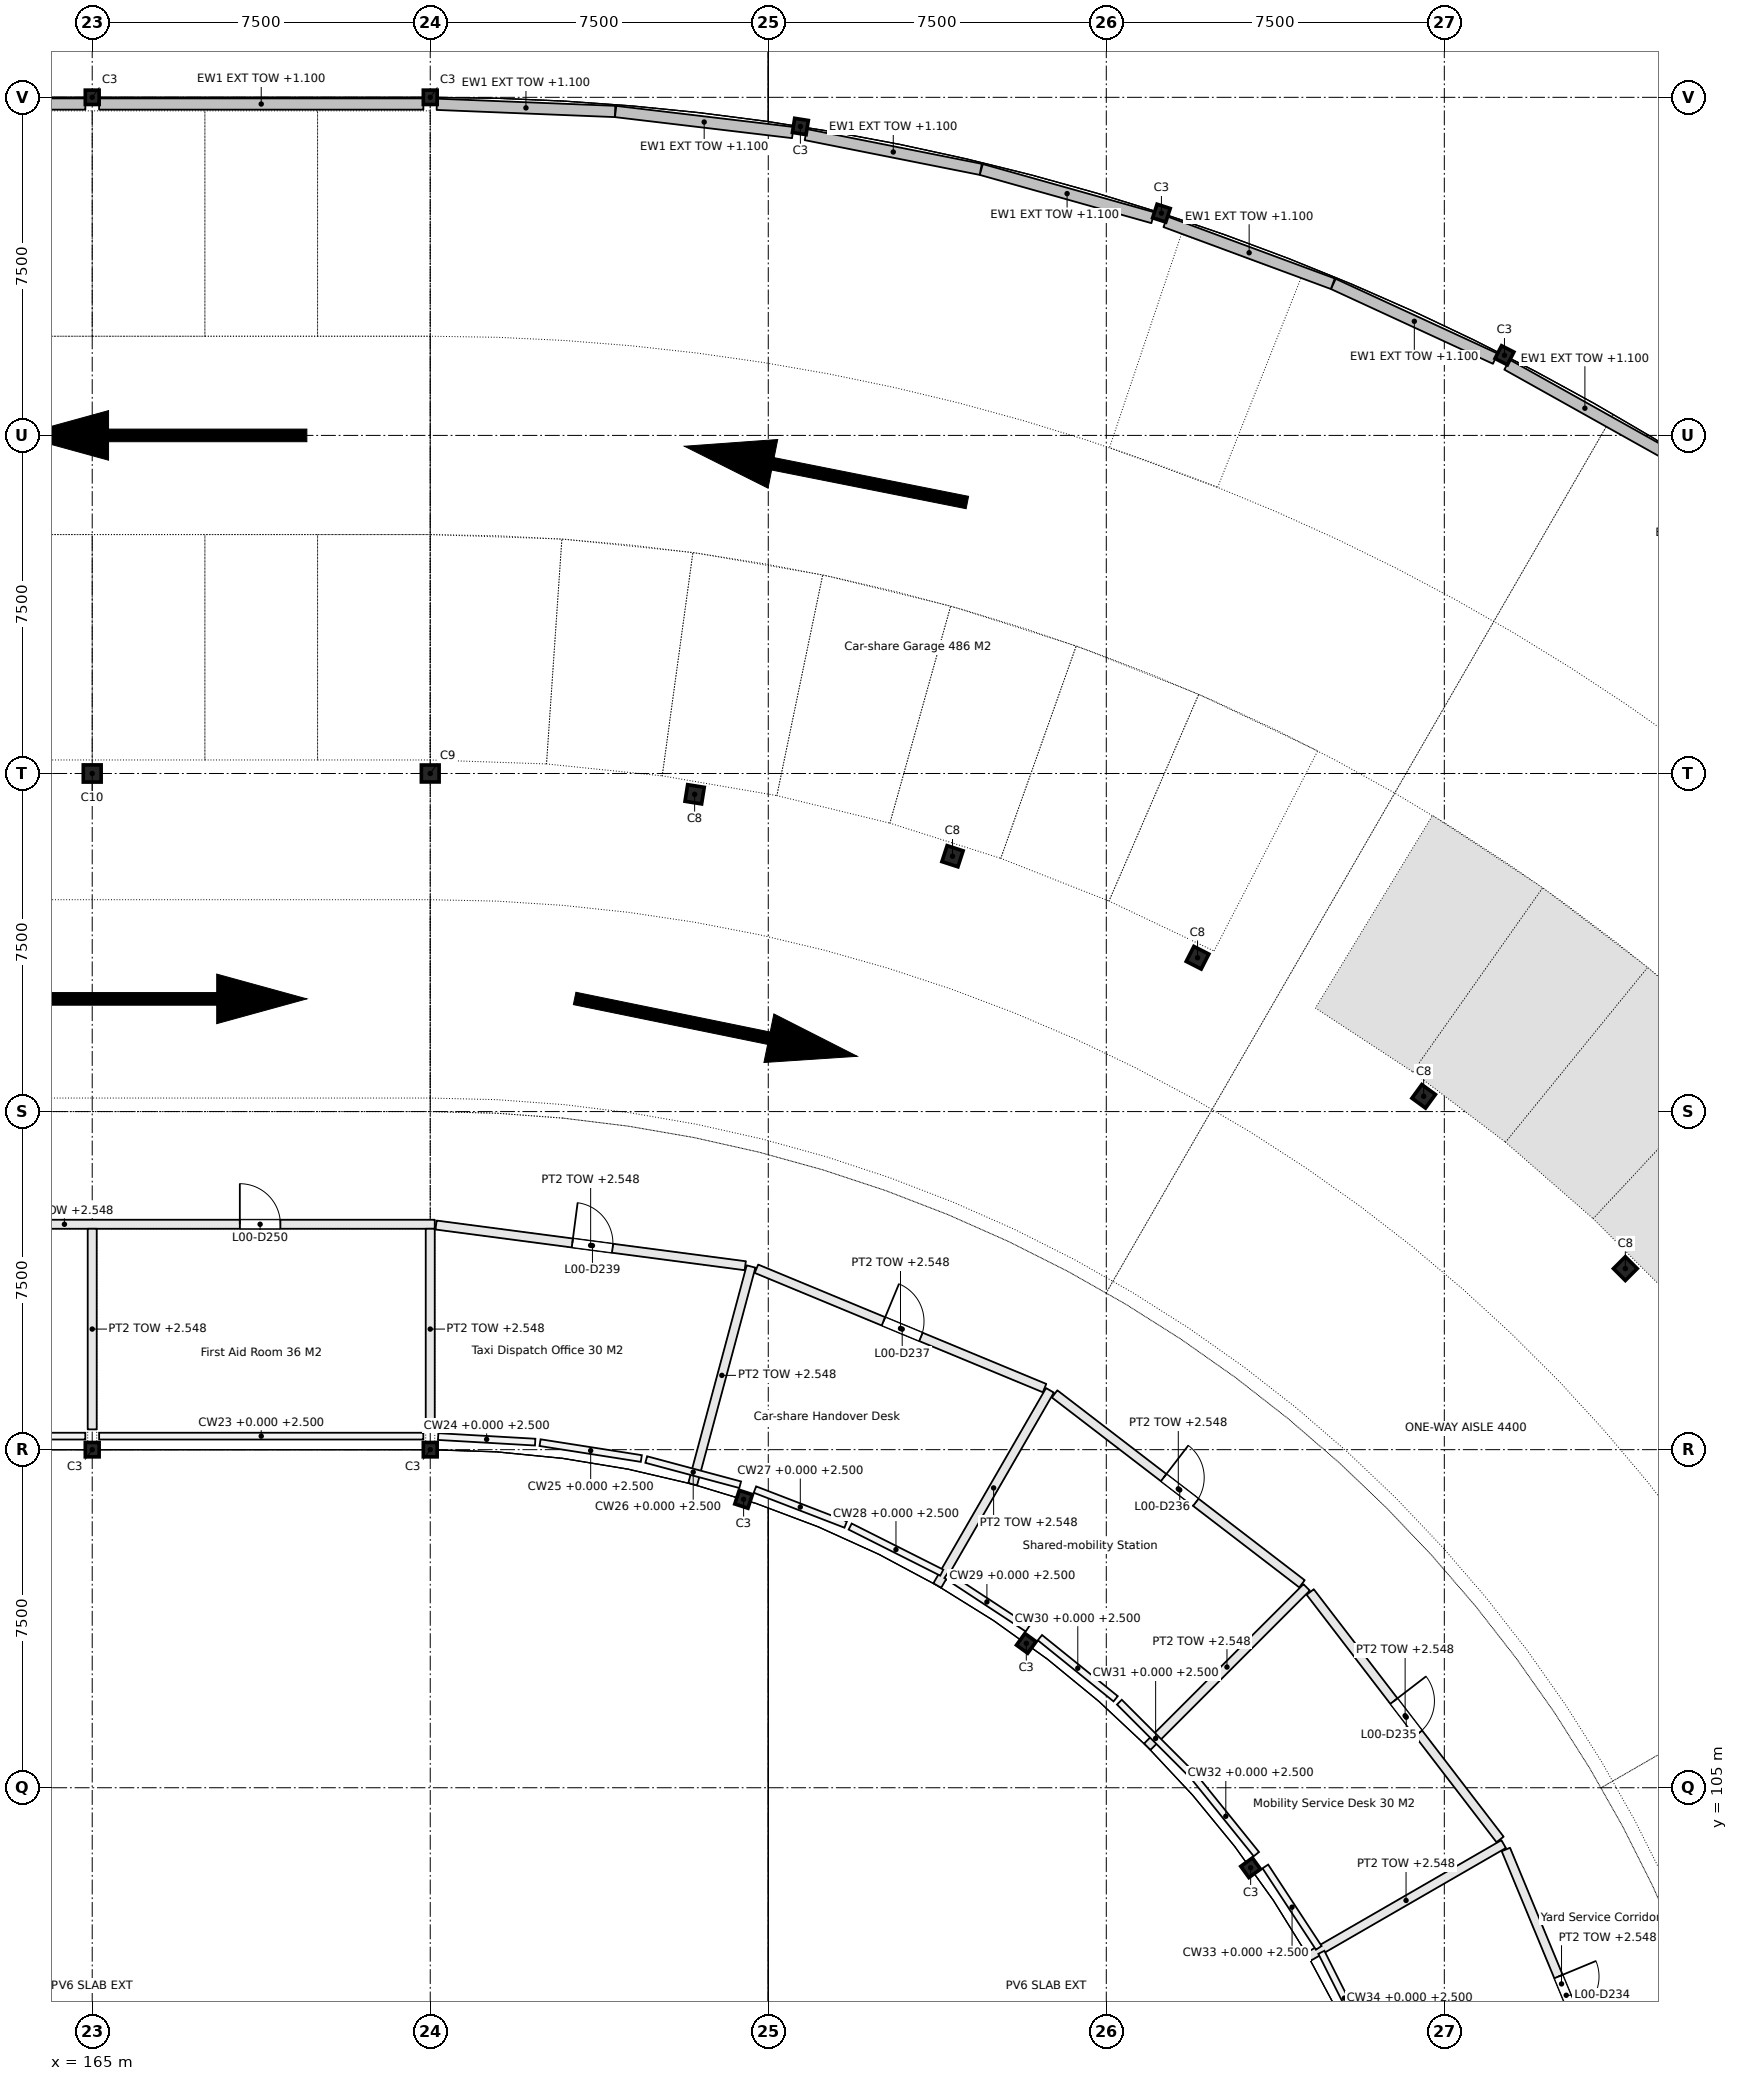
"""IFC4 building model, lengths in metres.
Left out: names, types, materials, properties, quantities, classifications, styles, units other than length and angle.
Written with IfcOpenShell. Run it as: python <this file> out.ifc"""

import sys

from ifc_helpers import new_model, si_unit, direction, frame, frame_2d, origin, origin_2d, place, context, subcontext, project, spatial, rectangle, i_section, extrude, element, fill, save


model = new_model("IFC4")
c1 = context("Model", 3, precision=1e-05, world=origin(), true_north=direction((0.0, 1.0)))
c2 = subcontext(c1, "Body", "Model", "MODEL_VIEW")
j1 = project(units=[si_unit("LENGTHUNIT", "METRE"), si_unit("PLANEANGLEUNIT", "RADIAN")], contexts=[c1])
p1 = place(None, origin())
s1 = spatial("IfcSite", under=j1, at=p1, CompositionType="ELEMENT")
p2 = place(p1, origin())
s2 = spatial("IfcBuilding", under=s1, at=p2, CompositionType="ELEMENT")
p3 = place(p2, origin())
s3 = spatial("IfcBuildingStorey", under=s2, at=p3, CompositionType="ELEMENT", Elevation=0.0)
p4 = place(p3, frame((165.0, 112.5, -0.25), z_axis=(0.0, 0.0, 1.0), x_axis=(1.0, 0.0, 0.0)))
e1 = element("IfcColumn", 1, at=p4, inside=s3, PredefinedType="COLUMN", context=c2, shape_type="SweptSolid", body=[
    extrude(i_section(OverallWidth=0.307, OverallDepth=0.318, WebThickness=0.013, FlangeThickness=0.021, FilletRadius=0.015, at=origin_2d()), origin(), (0.0, 0.0, 1.0), 3.55),
])
p5 = place(p3, frame((165.0, 127.5, -0.25), z_axis=(0.0, 0.0, 1.0), x_axis=(1.0, 0.0, 0.0)))
e2 = element("IfcColumn", 2, at=p5, inside=s3, PredefinedType="COLUMN", context=c2, shape_type="SweptSolid", body=[
    extrude(i_section(OverallWidth=0.396, OverallDepth=0.381, WebThickness=0.019, FlangeThickness=0.03, FilletRadius=0.015, at=origin_2d()), origin(), (0.0, 0.0, 1.0), 3.55),
])
for number, where, z_axis, x_axis in (
    (3, (165.0, 142.5, -0.25), (0.0, 0.0, 1.0), (1.0, 0.0, 0.0)),
    (4, (172.5, 112.5, -0.25), (0.0, 0.0, 1.0), (1.0, 0.0, 0.0)),
):
    element("IfcColumn", number, at=place(p3, frame(where, z_axis=z_axis, x_axis=x_axis)), inside=s3, PredefinedType="COLUMN", context=c2, shape_type="SweptSolid", body=[
        extrude(i_section(OverallWidth=0.307, OverallDepth=0.318, WebThickness=0.013, FlangeThickness=0.021, FilletRadius=0.015, at=origin_2d()), origin(), (0.0, 0.0, 1.0), 3.55),
    ])
p6 = place(p3, frame((172.5, 127.5, -0.25), z_axis=(0.0, 0.0, 1.0), x_axis=(1.0, 0.0, 0.0)))
e5 = element("IfcColumn", 5, at=p6, inside=s3, PredefinedType="COLUMN", context=c2, shape_type="SweptSolid", body=[
    extrude(i_section(OverallWidth=0.394, OverallDepth=0.376, WebThickness=0.017, FlangeThickness=0.028, FilletRadius=0.015, at=origin_2d()), origin(), (0.0, 0.0, 1.0), 3.55),
])
for number, where, z_axis, x_axis in (
    (6, (172.5, 142.5, -0.25), (0.0, 0.0, 1.0), (1.0, 0.0, 0.0)),
    (7, (179.453, 111.399, -0.25), (0.0, 0.0, 1.0), (-0.951, 0.309, 0.0)),
    (8, (185.725, 108.203, -0.25), (0.0, 0.0, 1.0), (-0.809, 0.588, 0.0)),
    (9, (190.703, 103.225, -0.25), (0.0, 0.0, 1.0), (-0.588, 0.809, 0.0)),
):
    element("IfcColumn", number, at=place(p3, frame(where, z_axis=z_axis, x_axis=x_axis)), inside=s3, PredefinedType="COLUMN", context=c2, shape_type="SweptSolid", body=[
        extrude(i_section(OverallWidth=0.307, OverallDepth=0.318, WebThickness=0.013, FlangeThickness=0.021, FilletRadius=0.015, at=origin_2d()), origin(), (0.0, 0.0, 1.0), 3.55),
    ])
for number, where, z_axis, x_axis in (
    (10, (178.366, 127.038, -0.25), (0.0, 0.0, 1.0), (-0.988, 0.156, 0.0)),
    (11, (184.088, 125.665, -0.25), (0.0, 0.0, 1.0), (-0.951, 0.309, 0.0)),
    (12, (189.525, 123.413, -0.25), (0.0, 0.0, 1.0), (-0.891, 0.454, 0.0)),
    (13, (194.542, 120.338, -0.25), (0.0, 0.0, 1.0), (-0.809, 0.588, 0.0)),
    (14, (199.017, 116.517, -0.25), (0.0, 0.0, 1.0), (-0.707, 0.707, 0.0)),
):
    element("IfcColumn", number, at=place(p3, frame(where, z_axis=z_axis, x_axis=x_axis)), inside=s3, PredefinedType="COLUMN", context=c2, shape_type="SweptSolid", body=[
        extrude(i_section(OverallWidth=0.373, OverallDepth=0.373, WebThickness=0.016, FlangeThickness=0.026, FilletRadius=0.015, at=origin_2d()), origin(), (0.0, 0.0, 1.0), 3.55),
    ])
for number, where, z_axis, x_axis in (
    (15, (180.713, 141.854, -0.25), (0.0, 0.0, 1.0), (-0.988, 0.156, 0.0)),
    (16, (188.723, 139.93, -0.25), (0.0, 0.0, 1.0), (-0.951, 0.309, 0.0)),
    (17, (196.334, 136.778, -0.25), (0.0, 0.0, 1.0), (-0.891, 0.454, 0.0)),
):
    element("IfcColumn", number, at=place(p3, frame(where, z_axis=z_axis, x_axis=x_axis)), inside=s3, PredefinedType="COLUMN", context=c2, shape_type="SweptSolid", body=[
        extrude(i_section(OverallWidth=0.307, OverallDepth=0.318, WebThickness=0.013, FlangeThickness=0.021, FilletRadius=0.015, at=origin_2d()), origin(), (0.0, 0.0, 1.0), 3.55),
    ])
p7 = place(p3, frame((150.0, 117.5, 0.0), z_axis=(0.0, 0.0, 1.0), x_axis=(1.0, 0.0, 0.0)))
e18 = element("IfcWall", 18, at=p7, inside=s3, PredefinedType="PARTITIONING", context=c2, shape_type="SweptSolid", body=[
    extrude(rectangle(XDim=22.6, YDim=0.2, at=frame_2d((11.3, 0.0))), origin(), (0.0, 0.0, 1.0), 2.548),
])
p8 = place(p7, frame((3.55, 0.0, 0.0)))
e19 = element("IfcOpeningElement", 19, at=p8, cuts=e18, PredefinedType="OPENING", context=c2, shape_type="SweptSolid", body=[
    extrude(rectangle(XDim=0.9, YDim=2.1, at=frame_2d((0.45, 1.05))), frame((0.0, 0.11, 0.0), z_axis=(0.0, -1.0, 0.0), x_axis=(1.0, 0.0, 0.0)), (0.0, 0.0, 1.0), 0.22),
])
p9 = place(p7, frame((10.775, 0.0, 0.0)))
e20 = element("IfcOpeningElement", 20, at=p9, cuts=e18, PredefinedType="OPENING", context=c2, shape_type="SweptSolid", body=[
    extrude(rectangle(XDim=0.9, YDim=2.1, at=frame_2d((0.45, 1.05))), frame((0.0, 0.11, 0.0), z_axis=(0.0, -1.0, 0.0), x_axis=(1.0, 0.0, 0.0)), (0.0, 0.0, 1.0), 0.22),
])
p10 = place(p7, frame((18.275, 0.0, 0.0)))
e21 = element("IfcOpeningElement", 21, at=p10, cuts=e18, PredefinedType="OPENING", context=c2, shape_type="SweptSolid", body=[
    extrude(rectangle(XDim=0.9, YDim=2.1, at=frame_2d((0.45, 1.05))), frame((0.0, 0.11, 0.0), z_axis=(0.0, -1.0, 0.0), x_axis=(1.0, 0.0, 0.0)), (0.0, 0.0, 1.0), 0.22),
])
p11 = place(p3, frame((172.629, 117.483, 0.0), z_axis=(0.0, 0.0, 1.0), x_axis=(0.991450812405, -0.130480981682, 0.0)))
e22 = element("IfcWall", 22, at=p11, inside=s3, PredefinedType="PARTITIONING", context=c2, shape_type="SweptSolid", body=[
    extrude(rectangle(XDim=6.919, YDim=0.2, at=frame_2d((3.459, 0.0))), origin(), (0.0, 0.0, 1.0), 2.548),
])
p12 = place(p11, frame((3.05, 0.0, 0.0)))
e23 = element("IfcOpeningElement", 23, at=p12, cuts=e22, PredefinedType="OPENING", context=c2, shape_type="SweptSolid", body=[
    extrude(rectangle(XDim=0.9, YDim=2.1, at=frame_2d((0.45, 1.05))), frame((0.0, 0.11, 0.0), z_axis=(0.0, -1.0, 0.0), x_axis=(1.0, 0.0, 0.0)), (0.0, 0.0, 1.0), 0.22),
])
p13 = place(p3, frame((178.323, 111.733, 0.0), z_axis=(0.0, 0.0, 1.0), x_axis=(0.258950830838, 0.965890504772, 0.0)))
e24 = element("IfcWall", 24, at=p13, inside=s3, PredefinedType="PARTITIONING", context=c2, shape_type="SweptSolid", body=[
    extrude(rectangle(XDim=5.001, YDim=0.2, at=frame_2d((2.5, 0.0))), origin(), (0.0, 0.0, 1.0), 2.548),
])
p14 = place(p3, frame((179.738, 116.513, 0.0), z_axis=(0.0, 0.0, 1.0), x_axis=(0.923886085904, -0.382667610693, 0.0)))
e25 = element("IfcWall", 25, at=p14, inside=s3, PredefinedType="PARTITIONING", context=c2, shape_type="SweptSolid", body=[
    extrude(rectangle(XDim=6.918, YDim=0.2, at=frame_2d((3.459, 0.0))), origin(), (0.0, 0.0, 1.0), 2.548),
])
p15 = place(p14, frame((3.05, 0.0, 0.0)))
e26 = element("IfcOpeningElement", 26, at=p15, cuts=e25, PredefinedType="OPENING", context=c2, shape_type="SweptSolid", body=[
    extrude(rectangle(XDim=0.9, YDim=2.1, at=frame_2d((0.45, 1.05))), frame((0.0, 0.11, 0.0), z_axis=(0.0, -1.0, 0.0), x_axis=(1.0, 0.0, 0.0)), (0.0, 0.0, 1.0), 0.22),
])
p16 = place(p3, frame((183.75, 109.486, 0.0), z_axis=(0.0, 0.0, 1.0), x_axis=(0.50002537861, 0.866010750942, 0.0)))
e27 = element("IfcWall", 27, at=p16, inside=s3, PredefinedType="PARTITIONING", context=c2, shape_type="SweptSolid", body=[
    extrude(rectangle(XDim=5.0, YDim=0.2, at=frame_2d((2.5, 0.0))), origin(), (0.0, 0.0, 1.0), 2.548),
])
p17 = place(p3, frame((186.353, 113.737, 0.0), z_axis=(0.0, 0.0, 1.0), x_axis=(0.793285942034, -0.608849254061, 0.0)))
e28 = element("IfcWall", 28, at=p17, inside=s3, PredefinedType="PARTITIONING", context=c2, shape_type="SweptSolid", body=[
    extrude(rectangle(XDim=6.919, YDim=0.2, at=frame_2d((3.459, 0.0))), origin(), (0.0, 0.0, 1.0), 2.548),
])
p18 = place(p17, frame((3.05, 0.0, 0.0)))
e29 = element("IfcOpeningElement", 29, at=p18, cuts=e28, PredefinedType="OPENING", context=c2, shape_type="SweptSolid", body=[
    extrude(rectangle(XDim=0.9, YDim=2.1, at=frame_2d((0.45, 1.05))), frame((0.0, 0.11, 0.0), z_axis=(0.0, -1.0, 0.0), x_axis=(1.0, 0.0, 0.0)), (0.0, 0.0, 1.0), 0.22),
])
p19 = place(p3, frame((188.41, 105.91, 0.0), z_axis=(0.0, 0.0, 1.0), x_axis=(0.707106781187, 0.707106781187, 0.0)))
e30 = element("IfcWall", 30, at=p19, inside=s3, PredefinedType="PARTITIONING", context=c2, shape_type="SweptSolid", body=[
    extrude(rectangle(XDim=5.0, YDim=0.2, at=frame_2d((2.5, 0.0))), origin(), (0.0, 0.0, 1.0), 2.548),
])
p20 = place(p3, frame((192.024, 109.342, 0.0), z_axis=(0.0, 0.0, 1.0), x_axis=(0.608849254061, -0.793285942034, 0.0)))
e31 = element("IfcWall", 31, at=p20, inside=s3, PredefinedType="PARTITIONING", context=c2, shape_type="SweptSolid", body=[
    extrude(rectangle(XDim=6.919, YDim=0.2, at=frame_2d((3.459, 0.0))), origin(), (0.0, 0.0, 1.0), 2.548),
])
p21 = place(p20, frame((3.05, 0.0, 0.0)))
e32 = element("IfcOpeningElement", 32, at=p21, cuts=e31, PredefinedType="OPENING", context=c2, shape_type="SweptSolid", body=[
    extrude(rectangle(XDim=0.9, YDim=2.1, at=frame_2d((0.45, 1.05))), frame((0.0, 0.11, 0.0), z_axis=(0.0, -1.0, 0.0), x_axis=(1.0, 0.0, 0.0)), (0.0, 0.0, 1.0), 0.22),
])
p22 = place(p3, frame((191.986, 101.25, 0.0), z_axis=(0.0, 0.0, 1.0), x_axis=(0.866010750942, 0.50002537861, 0.0)))
e33 = element("IfcWall", 33, at=p22, inside=s3, PredefinedType="PARTITIONING", context=c2, shape_type="SweptSolid", body=[
    extrude(rectangle(XDim=5.0, YDim=0.2, at=frame_2d((2.5, 0.0))), origin(), (0.0, 0.0, 1.0), 2.548),
])
p23 = place(p3, frame((196.366, 103.63, 0.0), z_axis=(0.0, 0.0, 1.0), x_axis=(0.382667610693, -0.923886085904, 0.0)))
e34 = element("IfcWall", 34, at=p23, inside=s3, PredefinedType="PARTITIONING", context=c2, shape_type="SweptSolid", body=[
    extrude(rectangle(XDim=6.918, YDim=0.2, at=frame_2d((3.459, 0.0))), origin(), (0.0, 0.0, 1.0), 2.548),
])
p24 = place(p23, frame((3.05, 0.0, 0.0)))
e35 = element("IfcOpeningElement", 35, at=p24, cuts=e34, PredefinedType="OPENING", context=c2, shape_type="SweptSolid", body=[
    extrude(rectangle(XDim=0.9, YDim=2.1, at=frame_2d((0.45, 1.05))), frame((0.0, 0.11, 0.0), z_axis=(0.0, -1.0, 0.0), x_axis=(1.0, 0.0, 0.0)), (0.0, 0.0, 1.0), 0.22),
])
for number, where, z_axis, x_axis in (
    (36, (165.0, 112.95, 0.0), (0.0, 0.0, 1.0), (0.0, 1.0, 0.0)),
    (37, (172.5, 112.95, 0.0), (0.0, 0.0, 1.0), (0.0, 1.0, 0.0)),
):
    element("IfcWall", number, at=place(p3, frame(where, z_axis=z_axis, x_axis=x_axis)), inside=s3, PredefinedType="PARTITIONING", context=c2, shape_type="SweptSolid", body=[
        extrude(rectangle(XDim=4.45, YDim=0.2, at=frame_2d((2.225, 0.0))), origin(), (0.0, 0.0, 1.0), 2.548),
    ])
p25 = place(p3, frame((199.846, 134.636, 0.0), z_axis=(0.0, 0.0, 1.0), x_axis=(-0.872642742612, 0.488359134006, 0.0)))
e38 = element("IfcWall", 38, at=p25, inside=s3, PredefinedType="SOLIDWALL", context=c2, shape_type="SweptSolid", body=[
    extrude(rectangle(XDim=3.957, YDim=0.25, at=frame_2d((1.979, 0.0))), origin(), (0.0, 0.0, 1.0), 1.1),
])
p26 = place(p3, frame((196.131, 136.702, 0.0), z_axis=(0.0, 0.0, 1.0), x_axis=(-0.908002709575, 0.418964293711, 0.0)))
e39 = element("IfcWall", 39, at=p26, inside=s3, PredefinedType="SOLIDWALL", context=c2, shape_type="SweptSolid", body=[
    extrude(rectangle(XDim=3.958, YDim=0.25, at=frame_2d((1.979, 0.0))), origin(), (0.0, 0.0, 1.0), 1.1),
])
p27 = place(p3, frame((192.526, 138.365, 0.0), z_axis=(0.0, 0.0, 1.0), x_axis=(-0.937863247295, 0.347005085515, 0.0)))
e40 = element("IfcWall", 40, at=p27, inside=s3, PredefinedType="SOLIDWALL", context=c2, shape_type="SweptSolid", body=[
    extrude(rectangle(XDim=3.96, YDim=0.25, at=frame_2d((1.98, 0.0))), origin(), (0.0, 0.0, 1.0), 1.1),
])
p28 = place(p3, frame((188.534, 139.829, 0.0), z_axis=(0.0, 0.0, 1.0), x_axis=(-0.962709736809, 0.270536434983, 0.0)))
e41 = element("IfcWall", 41, at=p28, inside=s3, PredefinedType="SOLIDWALL", context=c2, shape_type="SweptSolid", body=[
    extrude(rectangle(XDim=3.955, YDim=0.25, at=frame_2d((1.978, 0.0))), origin(), (0.0, 0.0, 1.0), 1.1),
])
for number, where, z_axis, x_axis in (
    (42, (184.714, 140.902, 0.0), (0.0, 0.0, 1.0), (-0.981, 0.195, 0.0)),
    (43, (180.543, 141.719, 0.0), (0.0, 0.0, 1.0), (-0.993, 0.118, 0.0)),
):
    element("IfcWall", number, at=place(p3, frame(where, z_axis=z_axis, x_axis=x_axis)), inside=s3, PredefinedType="SOLIDWALL", context=c2, shape_type="SweptSolid", body=[
        extrude(rectangle(XDim=3.958, YDim=0.25, at=frame_2d((1.979, 0.0))), origin(), (0.0, 0.0, 1.0), 1.1),
    ])
p29 = place(p3, frame((176.601, 142.186, 0.0), z_axis=(0.0, 0.0, 1.0), x_axis=(-0.999190876042, 0.040219314186, 0.0)))
e44 = element("IfcWall", 44, at=p29, inside=s3, PredefinedType="SOLIDWALL", context=c2, shape_type="SweptSolid", body=[
    extrude(rectangle(XDim=3.958, YDim=0.25, at=frame_2d((1.979, 0.0))), origin(), (0.0, 0.0, 1.0), 1.1),
])
for number, where, z_axis, x_axis in (
    (45, (172.347, 142.351, 0.0), (0.0, 0.0, 1.0), (-1.0, 0.0, 0.0)),
    (46, (164.847, 142.351, 0.0), (0.0, 0.0, 1.0), (-1.0, 0.0, 0.0)),
):
    element("IfcWall", number, at=place(p3, frame(where, z_axis=z_axis, x_axis=x_axis)), inside=s3, PredefinedType="SOLIDWALL", context=c2, shape_type="SweptSolid", body=[
        extrude(rectangle(XDim=7.195, YDim=0.25, at=frame_2d((3.597, 0.0))), origin(), (0.0, 0.0, 1.0), 1.1),
    ])
p30 = place(p24, origin())
e47 = element("IfcDoor", 47, at=p30, inside=s3, OperationType="SINGLE_SWING_RIGHT", PredefinedType="DOOR", context=c2, shape_type="SweptSolid", body=[
    extrude(rectangle(XDim=0.9, YDim=2.1, at=frame_2d((0.45, 1.05))), frame((0.0, 0.025, 0.0), z_axis=(0.0, -1.0, 0.0), x_axis=(1.0, 0.0, 0.0)), (0.0, 0.0, 1.0), 0.05),
])
fill(e35, e47)
p31 = place(p21, origin())
e48 = element("IfcDoor", 48, at=p31, inside=s3, OperationType="SINGLE_SWING_RIGHT", PredefinedType="DOOR", context=c2, shape_type="SweptSolid", body=[
    extrude(rectangle(XDim=0.9, YDim=2.1, at=frame_2d((0.45, 1.05))), frame((0.0, 0.025, 0.0), z_axis=(0.0, -1.0, 0.0), x_axis=(1.0, 0.0, 0.0)), (0.0, 0.0, 1.0), 0.05),
])
fill(e32, e48)
p32 = place(p18, origin())
e49 = element("IfcDoor", 49, at=p32, inside=s3, OperationType="SINGLE_SWING_RIGHT", PredefinedType="DOOR", context=c2, shape_type="SweptSolid", body=[
    extrude(rectangle(XDim=0.9, YDim=2.1, at=frame_2d((0.45, 1.05))), frame((0.0, 0.025, 0.0), z_axis=(0.0, -1.0, 0.0), x_axis=(1.0, 0.0, 0.0)), (0.0, 0.0, 1.0), 0.05),
])
fill(e29, e49)
p33 = place(p15, origin())
e50 = element("IfcDoor", 50, at=p33, inside=s3, OperationType="SINGLE_SWING_RIGHT", PredefinedType="DOOR", context=c2, shape_type="SweptSolid", body=[
    extrude(rectangle(XDim=0.9, YDim=2.1, at=frame_2d((0.45, 1.05))), frame((0.0, 0.025, 0.0), z_axis=(0.0, -1.0, 0.0), x_axis=(1.0, 0.0, 0.0)), (0.0, 0.0, 1.0), 0.05),
])
fill(e26, e50)
p34 = place(p12, origin())
e51 = element("IfcDoor", 51, at=p34, inside=s3, OperationType="SINGLE_SWING_RIGHT", PredefinedType="DOOR", context=c2, shape_type="SweptSolid", body=[
    extrude(rectangle(XDim=0.9, YDim=2.1, at=frame_2d((0.45, 1.05))), frame((0.0, 0.025, 0.0), z_axis=(0.0, -1.0, 0.0), x_axis=(1.0, 0.0, 0.0)), (0.0, 0.0, 1.0), 0.05),
])
fill(e23, e51)
p35 = place(p10, origin())
e52 = element("IfcDoor", 52, at=p35, inside=s3, OperationType="SINGLE_SWING_RIGHT", PredefinedType="DOOR", context=c2, shape_type="SweptSolid", body=[
    extrude(rectangle(XDim=0.9, YDim=2.1, at=frame_2d((0.45, 1.05))), frame((0.0, 0.025, 0.0), z_axis=(0.0, -1.0, 0.0), x_axis=(1.0, 0.0, 0.0)), (0.0, 0.0, 1.0), 0.05),
])
fill(e21, e52)
save(model, sys.argv[1])
